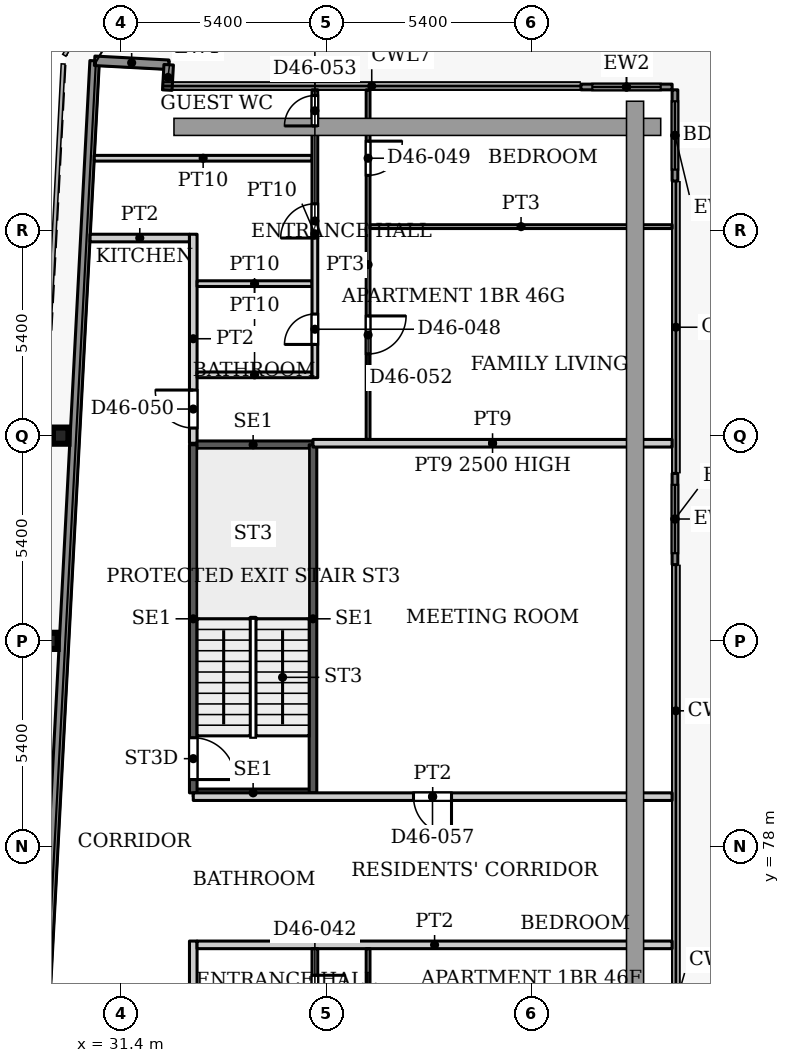
"""IFC4 building model, lengths in metres.
Left out: names, types, materials, properties, quantities, classifications, styles, units other than length and angle.
Written with IfcOpenShell. Run it as: python <this file> out.ifc"""

import sys

from ifc_helpers import new_model, si_unit, direction, frame, frame_2d, origin, origin_2d, place, context, subcontext, project, spatial, rectangle, i_section, extrude, source, transform, mapped, element, fill, save


model = new_model("IFC4")
c1 = context("Model", 3, precision=1e-05, world=origin(), true_north=direction((0.0, 1.0)))
c2 = subcontext(c1, "Body", "Model", "MODEL_VIEW")
j1 = project(units=[si_unit("LENGTHUNIT", "METRE"), si_unit("PLANEANGLEUNIT", "RADIAN")], contexts=[c1])
p1 = place(None, origin())
s1 = spatial("IfcSite", under=j1, at=p1, CompositionType="ELEMENT")
p2 = place(p1, origin())
s2 = spatial("IfcBuilding", under=s1, at=p2, CompositionType="ELEMENT")
p3 = place(p2, frame((0.0, 0.0, 195.5)))
s3 = spatial("IfcBuildingStorey", under=s2, at=p3, CompositionType="ELEMENT", Elevation=195.5)
for number, where, z_axis, x_axis in (
    (1, (29.527, 83.4, 0.0), (0.0, 0.0, 1.0), (1.0, 0.0, 0.0)),
    (2, (29.811, 88.8, 0.0), (0.0, 0.0, 1.0), (1.0, 0.0, 0.0)),
):
    element("IfcColumn", number, at=place(p3, frame(where, z_axis=z_axis, x_axis=x_axis)), inside=s3, PredefinedType="COLUMN", context=c2, shape_type="SweptSolid", body=[
        extrude(i_section(OverallWidth=0.409, OverallDepth=0.425, WebThickness=0.033, FlangeThickness=0.052, FilletRadius=0.013, at=origin_2d()), origin(), (0.0, 0.0, 1.0), 3.9),
    ])
p4 = place(p3, frame((27.195, 31.969, 0.0), z_axis=(0.0, 0.0, 1.0), x_axis=(0.052554995867, 0.998618031286, 0.0)))
e3 = element("IfcWall", 3, at=p4, inside=s3, PredefinedType="SOLIDWALL", context=c2, shape_type="SweptSolid", body=[
    extrude(rectangle(XDim=66.787, YDim=0.25, at=frame_2d((33.394, 0.0))), origin(), (0.0, 0.0, 1.0), 3.75),
])
p5 = place(p3, frame((30.705, 98.664, 0.0), z_axis=(0.0, 0.0, 1.0), x_axis=(0.998577785791, -0.053314216913, 0.0)))
e4 = element("IfcWall", 4, at=p5, inside=s3, PredefinedType="SOLIDWALL", context=c2, shape_type="SweptSolid", body=[
    extrude(rectangle(XDim=1.951, YDim=0.25, at=frame_2d((0.975, 0.0))), origin(), (0.0, 0.0, 1.0), 3.75),
])
p6 = place(p3, frame((32.653, 98.56, 0.0), z_axis=(0.0, 0.0, 1.0), x_axis=(-0.054093451632, -0.998535877418, 0.0)))
e5 = element("IfcWall", 5, at=p6, inside=s3, PredefinedType="SOLIDWALL", context=c2, shape_type="SweptSolid", body=[
    extrude(rectangle(XDim=0.668, YDim=0.25, at=frame_2d((0.334, 0.0))), origin(), (0.0, 0.0, 1.0), 3.75),
])
p7 = place(p3, frame((43.5, 97.975, 0.0), z_axis=(0.0, 0.0, 1.0), x_axis=(1.0, 0.0, 0.0)))
e6 = element("IfcWall", 6, at=p7, inside=s3, PredefinedType="SOLIDWALL", context=c2, shape_type="SweptSolid", body=[
    extrude(rectangle(XDim=2.4, YDim=0.15, at=frame_2d((1.2, 0.0))), origin(), (0.0, 0.0, 1.0), 3.75),
])
p8 = place(p7, frame((0.3, 0.0, 0.0)))
e7 = element("IfcOpeningElement", 7, at=p8, cuts=e6, PredefinedType="OPENING", context=c2, shape_type="SweptSolid", body=[
    extrude(rectangle(XDim=1.8, YDim=2.4, at=frame_2d((0.9, 1.2))), frame((0.0, 0.085, 0.0), z_axis=(0.0, -1.0, 0.0), x_axis=(1.0, 0.0, 0.0)), (0.0, 0.0, 1.0), 0.17),
])
p9 = place(p3, frame((45.975, 97.9, 0.0), z_axis=(0.0, 0.0, 1.0), x_axis=(0.0, -1.0, 0.0)))
e8 = element("IfcWall", 8, at=p9, inside=s3, PredefinedType="SOLIDWALL", context=c2, shape_type="SweptSolid", body=[
    extrude(rectangle(XDim=2.4, YDim=0.15, at=frame_2d((1.2, 0.0))), origin(), (0.0, 0.0, 1.0), 3.75),
])
p10 = place(p9, frame((0.3, 0.0, 0.0)))
e9 = element("IfcOpeningElement", 9, at=p10, cuts=e8, PredefinedType="OPENING", context=c2, shape_type="SweptSolid", body=[
    extrude(rectangle(XDim=1.8, YDim=2.4, at=frame_2d((0.9, 1.2))), frame((0.0, 0.085, 0.0), z_axis=(0.0, -1.0, 0.0), x_axis=(1.0, 0.0, 0.0)), (0.0, 0.0, 1.0), 0.17),
])
p11 = place(p3, frame((45.975, 87.806, 0.0), z_axis=(0.0, 0.0, 1.0), x_axis=(0.0, -1.0, 0.0)))
e10 = element("IfcWall", 10, at=p11, inside=s3, PredefinedType="SOLIDWALL", context=c2, shape_type="SweptSolid", body=[
    extrude(rectangle(XDim=2.4, YDim=0.15, at=frame_2d((1.2, 0.0))), origin(), (0.0, 0.0, 1.0), 3.75),
])
p12 = place(p11, frame((0.3, 0.0, 0.0)))
e11 = element("IfcOpeningElement", 11, at=p12, cuts=e10, PredefinedType="OPENING", context=c2, shape_type="SweptSolid", body=[
    extrude(rectangle(XDim=1.8, YDim=2.4, at=frame_2d((0.9, 1.2))), frame((0.0, 0.085, 0.0), z_axis=(0.0, -1.0, 0.0), x_axis=(1.0, 0.0, 0.0)), (0.0, 0.0, 1.0), 0.17),
])
for number, where, z_axis, x_axis in (
    (12, (33.3, 79.4, 0.0), (0.0, 0.0, 1.0), (1.0, 0.0, 0.0)),
    (13, (33.3, 88.56, 0.0), (0.0, 0.0, 1.0), (1.0, 0.0, 0.0)),
):
    element("IfcWall", number, at=place(p3, frame(where, z_axis=z_axis, x_axis=x_axis)), inside=s3, PredefinedType="SHEAR", context=c2, shape_type="SweptSolid", body=[
        extrude(rectangle(XDim=3.15, YDim=0.2, at=frame_2d((1.575, 0.0))), origin(), (0.0, 0.0, 1.0), 3.9),
    ])
p13 = place(p3, frame((33.3, 79.4, 0.0), z_axis=(0.0, 0.0, 1.0), x_axis=(0.0, 1.0, 0.0)))
e14 = element("IfcWall", 14, at=p13, inside=s3, PredefinedType="SHEAR", context=c2, shape_type="SweptSolid", body=[
    extrude(rectangle(XDim=9.16, YDim=0.2, at=frame_2d((4.58, 0.0))), origin(), (0.0, 0.0, 1.0), 3.9),
])
p14 = place(p13, frame((0.35, 0.0, 0.0)))
e15 = element("IfcOpeningElement", 15, at=p14, cuts=e14, PredefinedType="OPENING", context=c2, shape_type="SweptSolid", body=[
    extrude(rectangle(XDim=1.1, YDim=2.2, at=frame_2d((0.55, 1.1))), frame((0.0, 0.11, 0.0), z_axis=(0.0, -1.0, 0.0), x_axis=(1.0, 0.0, 0.0)), (0.0, 0.0, 1.0), 0.22),
])
p15 = place(p3, frame((36.45, 79.4, 0.0), z_axis=(0.0, 0.0, 1.0), x_axis=(0.0, 1.0, 0.0)))
e16 = element("IfcWall", 16, at=p15, inside=s3, PredefinedType="SHEAR", context=c2, shape_type="SweptSolid", body=[
    extrude(rectangle(XDim=9.16, YDim=0.2, at=frame_2d((4.58, 0.0))), origin(), (0.0, 0.0, 1.0), 3.9),
])
p16 = place(p3, frame((30.695, 96.1, 0.0), z_axis=(0.0, 0.0, 1.0), x_axis=(1.0, 0.0, 0.0)))
e17 = element("IfcWall", 17, at=p16, inside=s3, PredefinedType="PARTITIONING", context=c2, shape_type="SweptSolid", body=[
    extrude(rectangle(XDim=5.73, YDim=0.15, at=frame_2d((2.865, 0.0))), origin(), (0.0, 0.0, 1.0), 3.6),
])
p17 = place(p3, frame((30.585, 94.0, 0.0), z_axis=(0.0, 0.0, 1.0), x_axis=(1.0, 0.0, 0.0)))
e18 = element("IfcWall", 18, at=p17, inside=s3, PredefinedType="PARTITIONING", context=c2, shape_type="SweptSolid", body=[
    extrude(rectangle(XDim=2.615, YDim=0.2, at=frame_2d((1.308, 0.0))), origin(), (0.0, 0.0, 1.0), 3.6),
])
p18 = place(p3, frame((33.3, 57.9, 0.0), z_axis=(0.0, 0.0, 1.0), x_axis=(0.0, 1.0, 0.0)))
e19 = element("IfcWall", 19, at=p18, inside=s3, PredefinedType="PARTITIONING", context=c2, shape_type="SweptSolid", body=[
    extrude(rectangle(XDim=17.6, YDim=0.2, at=frame_2d((8.8, 0.0))), origin(), (0.0, 0.0, 1.0), 3.6),
])
p19 = place(p18, frame((5.0, 0.0, 0.0)))
e20 = element("IfcOpeningElement", 20, at=p19, cuts=e19, PredefinedType="OPENING", context=c2, shape_type="SweptSolid", body=[
    extrude(rectangle(XDim=1.0, YDim=2.1, at=frame_2d((0.5, 1.05))), frame((0.0, 0.11, 0.0), z_axis=(0.0, -1.0, 0.0), x_axis=(1.0, 0.0, 0.0)), (0.0, 0.0, 1.0), 0.22),
])
p20 = place(p18, frame((9.2, 0.0, 0.0)))
e21 = element("IfcOpeningElement", 21, at=p20, cuts=e19, PredefinedType="OPENING", context=c2, shape_type="SweptSolid", body=[
    extrude(rectangle(XDim=1.0, YDim=2.1, at=frame_2d((0.5, 1.05))), frame((0.0, 0.11, 0.0), z_axis=(0.0, -1.0, 0.0), x_axis=(1.0, 0.0, 0.0)), (0.0, 0.0, 1.0), 0.22),
])
p21 = place(p3, frame((33.3, 79.3, 0.0), z_axis=(0.0, 0.0, 1.0), x_axis=(1.0, 0.0, 0.0)))
e22 = element("IfcWall", 22, at=p21, inside=s3, PredefinedType="PARTITIONING", context=c2, shape_type="SweptSolid", body=[
    extrude(rectangle(XDim=12.6, YDim=0.2, at=frame_2d((6.3, 0.0))), origin(), (0.0, 0.0, 1.0), 3.6),
])
p22 = place(p21, frame((5.795, 0.0, 0.0)))
e23 = element("IfcOpeningElement", 23, at=p22, cuts=e22, PredefinedType="OPENING", context=c2, shape_type="SweptSolid", body=[
    extrude(rectangle(XDim=1.0, YDim=2.1, at=frame_2d((0.5, 1.05))), frame((0.0, 0.11, 0.0), z_axis=(0.0, -1.0, 0.0), x_axis=(1.0, 0.0, 0.0)), (0.0, 0.0, 1.0), 0.22),
])
p23 = place(p3, frame((33.3, 88.6, 0.0), z_axis=(0.0, 0.0, 1.0), x_axis=(0.0, 1.0, 0.0)))
e24 = element("IfcWall", 24, at=p23, inside=s3, PredefinedType="PARTITIONING", context=c2, shape_type="SweptSolid", body=[
    extrude(rectangle(XDim=5.5, YDim=0.2, at=frame_2d((2.75, 0.0))), origin(), (0.0, 0.0, 1.0), 3.6),
])
p24 = place(p23, frame((0.4, 0.0, 0.0)))
e25 = element("IfcOpeningElement", 25, at=p24, cuts=e24, PredefinedType="OPENING", context=c2, shape_type="SweptSolid", body=[
    extrude(rectangle(XDim=1.0, YDim=2.1, at=frame_2d((0.5, 1.05))), frame((0.0, 0.11, 0.0), z_axis=(0.0, -1.0, 0.0), x_axis=(1.0, 0.0, 0.0)), (0.0, 0.0, 1.0), 0.22),
])
p25 = place(p3, frame((33.4, 75.4, 0.0), z_axis=(0.0, 0.0, 1.0), x_axis=(1.0, 0.0, 0.0)))
e26 = element("IfcWall", 26, at=p25, inside=s3, PredefinedType="PARTITIONING", context=c2, shape_type="SweptSolid", body=[
    extrude(rectangle(XDim=12.5, YDim=0.2, at=frame_2d((6.25, 0.0))), origin(), (0.0, 0.0, 1.0), 3.6),
])
for number, where, z_axis, x_axis in (
    (27, (33.4, 90.4, 0.0), (0.0, 0.0, 1.0), (1.0, 0.0, 0.0)),
    (28, (33.4, 92.8, 0.0), (0.0, 0.0, 1.0), (1.0, 0.0, 0.0)),
):
    element("IfcWall", number, at=place(p3, frame(where, z_axis=z_axis, x_axis=x_axis)), inside=s3, PredefinedType="PARTITIONING", context=c2, shape_type="SweptSolid", body=[
        extrude(rectangle(XDim=3.025, YDim=0.15, at=frame_2d((1.513, 0.0))), origin(), (0.0, 0.0, 1.0), 3.6),
    ])
p26 = place(p3, frame((36.5, 68.45, 0.0), z_axis=(0.0, 0.0, 1.0), x_axis=(0.0, 1.0, 0.0)))
e29 = element("IfcWall", 29, at=p26, inside=s3, PredefinedType="PARTITIONING", context=c2, shape_type="SweptSolid", body=[
    extrude(rectangle(XDim=6.85, YDim=0.15, at=frame_2d((3.425, 0.0))), origin(), (0.0, 0.0, 1.0), 3.6),
])
p27 = place(p26, frame((5.35, 0.0, 0.0)))
e30 = element("IfcOpeningElement", 30, at=p27, cuts=e29, PredefinedType="OPENING", context=c2, shape_type="SweptSolid", body=[
    extrude(rectangle(XDim=0.8, YDim=2.1, at=frame_2d((0.4, 1.05))), frame((0.0, 0.085, 0.0), z_axis=(0.0, -1.0, 0.0), x_axis=(1.0, 0.0, 0.0)), (0.0, 0.0, 1.0), 0.17),
])
p28 = place(p26, frame((1.1, 0.0, 0.0)))
e31 = element("IfcOpeningElement", 31, at=p28, cuts=e29, PredefinedType="OPENING", context=c2, shape_type="SweptSolid", body=[
    extrude(rectangle(XDim=0.9, YDim=2.1, at=frame_2d((0.45, 1.05))), frame((0.0, 0.085, 0.0), z_axis=(0.0, -1.0, 0.0), x_axis=(1.0, 0.0, 0.0)), (0.0, 0.0, 1.0), 0.17),
])
p29 = place(p26, frame((3.4, 0.0, 0.0)))
e32 = element("IfcOpeningElement", 32, at=p29, cuts=e29, PredefinedType="OPENING", context=c2, shape_type="SweptSolid", body=[
    extrude(rectangle(XDim=0.8, YDim=2.1, at=frame_2d((0.4, 1.05))), frame((0.0, 0.085, 0.0), z_axis=(0.0, -1.0, 0.0), x_axis=(1.0, 0.0, 0.0)), (0.0, 0.0, 1.0), 0.17),
])
p30 = place(p3, frame((36.45, 88.6, 0.0), z_axis=(0.0, 0.0, 1.0), x_axis=(1.0, 0.0, 0.0)))
e33 = element("IfcWall", 33, at=p30, inside=s3, PredefinedType="PARTITIONING", context=c2, shape_type="SweptSolid", body=[
    extrude(rectangle(XDim=9.45, YDim=0.2, at=frame_2d((4.725, 0.0))), origin(), (0.0, 0.0, 1.0), 2.5),
])
p31 = place(p3, frame((36.5, 90.325, 0.0), z_axis=(0.0, 0.0, 1.0), x_axis=(0.0, 1.0, 0.0)))
e34 = element("IfcWall", 34, at=p31, inside=s3, PredefinedType="PARTITIONING", context=c2, shape_type="SweptSolid", body=[
    extrude(rectangle(XDim=7.575, YDim=0.15, at=frame_2d((3.788, 0.0))), origin(), (0.0, 0.0, 1.0), 3.6),
])
p32 = place(p31, frame((0.875, 0.0, 0.0)))
e35 = element("IfcOpeningElement", 35, at=p32, cuts=e34, PredefinedType="OPENING", context=c2, shape_type="SweptSolid", body=[
    extrude(rectangle(XDim=0.8, YDim=2.1, at=frame_2d((0.4, 1.05))), frame((0.0, 0.085, 0.0), z_axis=(0.0, -1.0, 0.0), x_axis=(1.0, 0.0, 0.0)), (0.0, 0.0, 1.0), 0.17),
])
p33 = place(p31, frame((3.675, 0.0, 0.0)))
e36 = element("IfcOpeningElement", 36, at=p33, cuts=e34, PredefinedType="OPENING", context=c2, shape_type="SweptSolid", body=[
    extrude(rectangle(XDim=0.9, YDim=2.1, at=frame_2d((0.45, 1.05))), frame((0.0, 0.085, 0.0), z_axis=(0.0, -1.0, 0.0), x_axis=(1.0, 0.0, 0.0)), (0.0, 0.0, 1.0), 0.17),
])
p34 = place(p31, frame((6.625, 0.0, 0.0)))
e37 = element("IfcOpeningElement", 37, at=p34, cuts=e34, PredefinedType="OPENING", context=c2, shape_type="SweptSolid", body=[
    extrude(rectangle(XDim=0.8, YDim=2.1, at=frame_2d((0.4, 1.05))), frame((0.0, 0.085, 0.0), z_axis=(0.0, -1.0, 0.0), x_axis=(1.0, 0.0, 0.0)), (0.0, 0.0, 1.0), 0.17),
])
p35 = place(p3, frame((37.9, 66.8, 0.0), z_axis=(0.0, 0.0, 1.0), x_axis=(0.0, 1.0, 0.0)))
e38 = element("IfcWall", 38, at=p35, inside=s3, PredefinedType="PARTITIONING", context=c2, shape_type="SweptSolid", body=[
    extrude(rectangle(XDim=8.5, YDim=0.1, at=frame_2d((4.25, 0.0))), origin(), (0.0, 0.0, 1.0), 3.6),
])
p36 = place(p35, frame((6.2, 0.0, 0.0)))
e39 = element("IfcOpeningElement", 39, at=p36, cuts=e38, PredefinedType="OPENING", context=c2, shape_type="SweptSolid", body=[
    extrude(rectangle(XDim=0.9, YDim=2.1, at=frame_2d((0.45, 1.05))), frame((0.0, 0.06, 0.0), z_axis=(0.0, -1.0, 0.0), x_axis=(1.0, 0.0, 0.0)), (0.0, 0.0, 1.0), 0.12),
])
p37 = place(p35, frame((1.8, 0.0, 0.0)))
e40 = element("IfcOpeningElement", 40, at=p37, cuts=e38, PredefinedType="OPENING", context=c2, shape_type="SweptSolid", body=[
    extrude(rectangle(XDim=1.0, YDim=2.1, at=frame_2d((0.5, 1.05))), frame((0.0, 0.06, 0.0), z_axis=(0.0, -1.0, 0.0), x_axis=(1.0, 0.0, 0.0)), (0.0, 0.0, 1.0), 0.12),
])
p38 = place(p3, frame((37.9, 88.7, 0.0), z_axis=(0.0, 0.0, 1.0), x_axis=(0.0, 1.0, 0.0)))
e41 = element("IfcWall", 41, at=p38, inside=s3, PredefinedType="PARTITIONING", context=c2, shape_type="SweptSolid", body=[
    extrude(rectangle(XDim=9.2, YDim=0.1, at=frame_2d((4.6, 0.0))), origin(), (0.0, 0.0, 1.0), 3.6),
])
p39 = place(p38, frame((6.95, 0.0, 0.0)))
e42 = element("IfcOpeningElement", 42, at=p39, cuts=e41, PredefinedType="OPENING", context=c2, shape_type="SweptSolid", body=[
    extrude(rectangle(XDim=0.9, YDim=2.1, at=frame_2d((0.45, 1.05))), frame((0.0, 0.06, 0.0), z_axis=(0.0, -1.0, 0.0), x_axis=(1.0, 0.0, 0.0)), (0.0, 0.0, 1.0), 0.12),
])
p40 = place(p38, frame((2.25, 0.0, 0.0)))
e43 = element("IfcOpeningElement", 43, at=p40, cuts=e41, PredefinedType="OPENING", context=c2, shape_type="SweptSolid", body=[
    extrude(rectangle(XDim=1.0, YDim=2.1, at=frame_2d((0.5, 1.05))), frame((0.0, 0.06, 0.0), z_axis=(0.0, -1.0, 0.0), x_axis=(1.0, 0.0, 0.0)), (0.0, 0.0, 1.0), 0.12),
])
p41 = place(p3, frame((37.95, 94.3, 0.0), z_axis=(0.0, 0.0, 1.0), x_axis=(1.0, 0.0, 0.0)))
e44 = element("IfcWall", 44, at=p41, inside=s3, PredefinedType="PARTITIONING", context=c2, shape_type="SweptSolid", body=[
    extrude(rectangle(XDim=7.95, YDim=0.1, at=frame_2d((3.975, 0.0))), origin(), (0.0, 0.0, 1.0), 3.6),
])
m1 = source(origin(), c2, "Body", "SweptSolid", [
    extrude(rectangle(XDim=1.8, YDim=2.4, at=frame_2d((0.9, 1.2))), frame((0.0, 0.025, 0.0), z_axis=(0.0, -1.0, 0.0), x_axis=(1.0, 0.0, 0.0)), (0.0, 0.0, 1.0), 0.05),
])
p42 = place(p8, origin())
e45 = element("IfcDoor", 45, at=p42, inside=s3, OperationType="SLIDING_TO_LEFT", PredefinedType="DOOR", context=c2, shape_type="MappedRepresentation", body=[
    mapped(m1, transform((0.0, 0.0, 0.0), x_axis=(1.0, 0.0, 0.0), y_axis=(0.0, 1.0, 0.0), z_axis=(0.0, 0.0, 1.0), scale=1.0)),
])
fill(e7, e45)
p43 = place(p10, origin())
e46 = element("IfcDoor", 46, at=p43, inside=s3, OperationType="SLIDING_TO_LEFT", PredefinedType="DOOR", context=c2, shape_type="MappedRepresentation", body=[
    mapped(m1, transform((0.0, 0.0, 0.0), x_axis=(1.0, 0.0, 0.0), y_axis=(0.0, 1.0, 0.0), z_axis=(0.0, 0.0, 1.0), scale=1.0)),
])
fill(e9, e46)
p44 = place(p12, origin())
e47 = element("IfcDoor", 47, at=p44, inside=s3, OperationType="SLIDING_TO_LEFT", PredefinedType="DOOR", context=c2, shape_type="MappedRepresentation", body=[
    mapped(m1, transform((0.0, 0.0, 0.0), x_axis=(1.0, 0.0, 0.0), y_axis=(0.0, 1.0, 0.0), z_axis=(0.0, 0.0, 1.0), scale=1.0)),
])
fill(e11, e47)
m2 = source(origin(), c2, "Body", "SweptSolid", [
    extrude(rectangle(XDim=1.1, YDim=2.2, at=frame_2d((0.55, 1.1))), frame((0.0, 0.025, 0.0), z_axis=(0.0, -1.0, 0.0), x_axis=(1.0, 0.0, 0.0)), (0.0, 0.0, 1.0), 0.05),
])
p45 = place(p14, origin())
e48 = element("IfcDoor", 48, at=p45, inside=s3, OperationType="SINGLE_SWING_RIGHT", PredefinedType="DOOR", context=c2, shape_type="MappedRepresentation", body=[
    mapped(m2, transform((0.0, 0.0, 0.0), x_axis=(1.0, 0.0, 0.0), y_axis=(0.0, 1.0, 0.0), z_axis=(0.0, 0.0, 1.0), scale=1.0)),
])
fill(e15, e48)
m3 = source(origin(), c2, "Body", "SweptSolid", [
    extrude(rectangle(XDim=0.8, YDim=2.1, at=frame_2d((0.4, 1.05))), frame((0.0, 0.025, 0.0), z_axis=(0.0, -1.0, 0.0), x_axis=(1.0, 0.0, 0.0)), (0.0, 0.0, 1.0), 0.05),
])
p46 = place(p27, origin())
e49 = element("IfcDoor", 49, at=p46, inside=s3, OperationType="SINGLE_SWING_RIGHT", PredefinedType="DOOR", context=c2, shape_type="MappedRepresentation", body=[
    mapped(m3, transform((0.0, 0.0, 0.0), x_axis=(1.0, 0.0, 0.0), y_axis=(0.0, 1.0, 0.0), z_axis=(0.0, 0.0, 1.0), scale=1.0)),
])
fill(e30, e49)
p47 = place(p32, origin())
e50 = element("IfcDoor", 50, at=p47, inside=s3, OperationType="SINGLE_SWING_LEFT", PredefinedType="DOOR", context=c2, shape_type="MappedRepresentation", body=[
    mapped(m3, transform((0.0, 0.0, 0.0), x_axis=(1.0, 0.0, 0.0), y_axis=(0.0, 1.0, 0.0), z_axis=(0.0, 0.0, 1.0), scale=1.0)),
])
fill(e35, e50)
m4 = source(origin(), c2, "Body", "SweptSolid", [
    extrude(rectangle(XDim=0.9, YDim=2.1, at=frame_2d((0.45, 1.05))), frame((0.0, 0.025, 0.0), z_axis=(0.0, -1.0, 0.0), x_axis=(1.0, 0.0, 0.0)), (0.0, 0.0, 1.0), 0.05),
])
p48 = place(p39, origin())
e51 = element("IfcDoor", 51, at=p48, inside=s3, OperationType="SINGLE_SWING_RIGHT", PredefinedType="DOOR", context=c2, shape_type="MappedRepresentation", body=[
    mapped(m4, transform((0.0, 0.0, 0.0), x_axis=(1.0, 0.0, 0.0), y_axis=(0.0, 1.0, 0.0), z_axis=(0.0, 0.0, 1.0), scale=1.0)),
])
fill(e42, e51)
m5 = source(origin(), c2, "Body", "SweptSolid", [
    extrude(rectangle(XDim=1.0, YDim=2.1, at=frame_2d((0.5, 1.05))), frame((0.0, 0.025, 0.0), z_axis=(0.0, -1.0, 0.0), x_axis=(1.0, 0.0, 0.0)), (0.0, 0.0, 1.0), 0.05),
])
p49 = place(p24, origin())
e52 = element("IfcDoor", 52, at=p49, inside=s3, OperationType="SINGLE_SWING_LEFT", PredefinedType="DOOR", context=c2, shape_type="MappedRepresentation", body=[
    mapped(m5, transform((0.0, 0.0, 0.0), x_axis=(1.0, 0.0, 0.0), y_axis=(0.0, 1.0, 0.0), z_axis=(0.0, 0.0, 1.0), scale=1.0)),
])
fill(e25, e52)
p50 = place(p33, origin())
e53 = element("IfcDoor", 53, at=p50, inside=s3, OperationType="SINGLE_SWING_LEFT", PredefinedType="DOOR", context=c2, shape_type="MappedRepresentation", body=[
    mapped(m4, transform((0.0, 0.0, 0.0), x_axis=(1.0, 0.0, 0.0), y_axis=(0.0, 1.0, 0.0), z_axis=(0.0, 0.0, 1.0), scale=1.0)),
])
fill(e36, e53)
m6 = source(origin(), c2, "Body", "SweptSolid", [
    extrude(rectangle(XDim=1.0, YDim=2.1, at=frame_2d((0.5, 1.05))), frame((0.0, 0.025, 0.0), z_axis=(0.0, -1.0, 0.0), x_axis=(1.0, 0.0, 0.0)), (0.0, 0.0, 1.0), 0.05),
])
p51 = place(p40, origin())
e54 = element("IfcDoor", 54, at=p51, inside=s3, OperationType="SINGLE_SWING_RIGHT", PredefinedType="DOOR", context=c2, shape_type="MappedRepresentation", body=[
    mapped(m6, transform((0.0, 0.0, 0.0), x_axis=(1.0, 0.0, 0.0), y_axis=(0.0, 1.0, 0.0), z_axis=(0.0, 0.0, 1.0), scale=1.0)),
])
fill(e43, e54)
p52 = place(p34, origin())
e55 = element("IfcDoor", 55, at=p52, inside=s3, OperationType="SINGLE_SWING_LEFT", PredefinedType="DOOR", context=c2, shape_type="MappedRepresentation", body=[
    mapped(m3, transform((0.0, 0.0, 0.0), x_axis=(1.0, 0.0, 0.0), y_axis=(0.0, 1.0, 0.0), z_axis=(0.0, 0.0, 1.0), scale=1.0)),
])
fill(e37, e55)
m7 = source(origin(), c2, "Body", "SweptSolid", [
    extrude(rectangle(XDim=1.0, YDim=2.1, at=frame_2d((0.5, 1.05))), frame((0.0, 0.025, 0.0), z_axis=(0.0, -1.0, 0.0), x_axis=(1.0, 0.0, 0.0)), (0.0, 0.0, 1.0), 0.05),
])
p53 = place(p22, origin())
e56 = element("IfcDoor", 56, at=p53, inside=s3, OperationType="SINGLE_SWING_RIGHT", PredefinedType="DOOR", context=c2, shape_type="MappedRepresentation", body=[
    mapped(m7, transform((0.0, 0.0, 0.0), x_axis=(1.0, 0.0, 0.0), y_axis=(0.0, 1.0, 0.0), z_axis=(0.0, 0.0, 1.0), scale=1.0)),
])
fill(e23, e56)
save(model, sys.argv[1])
